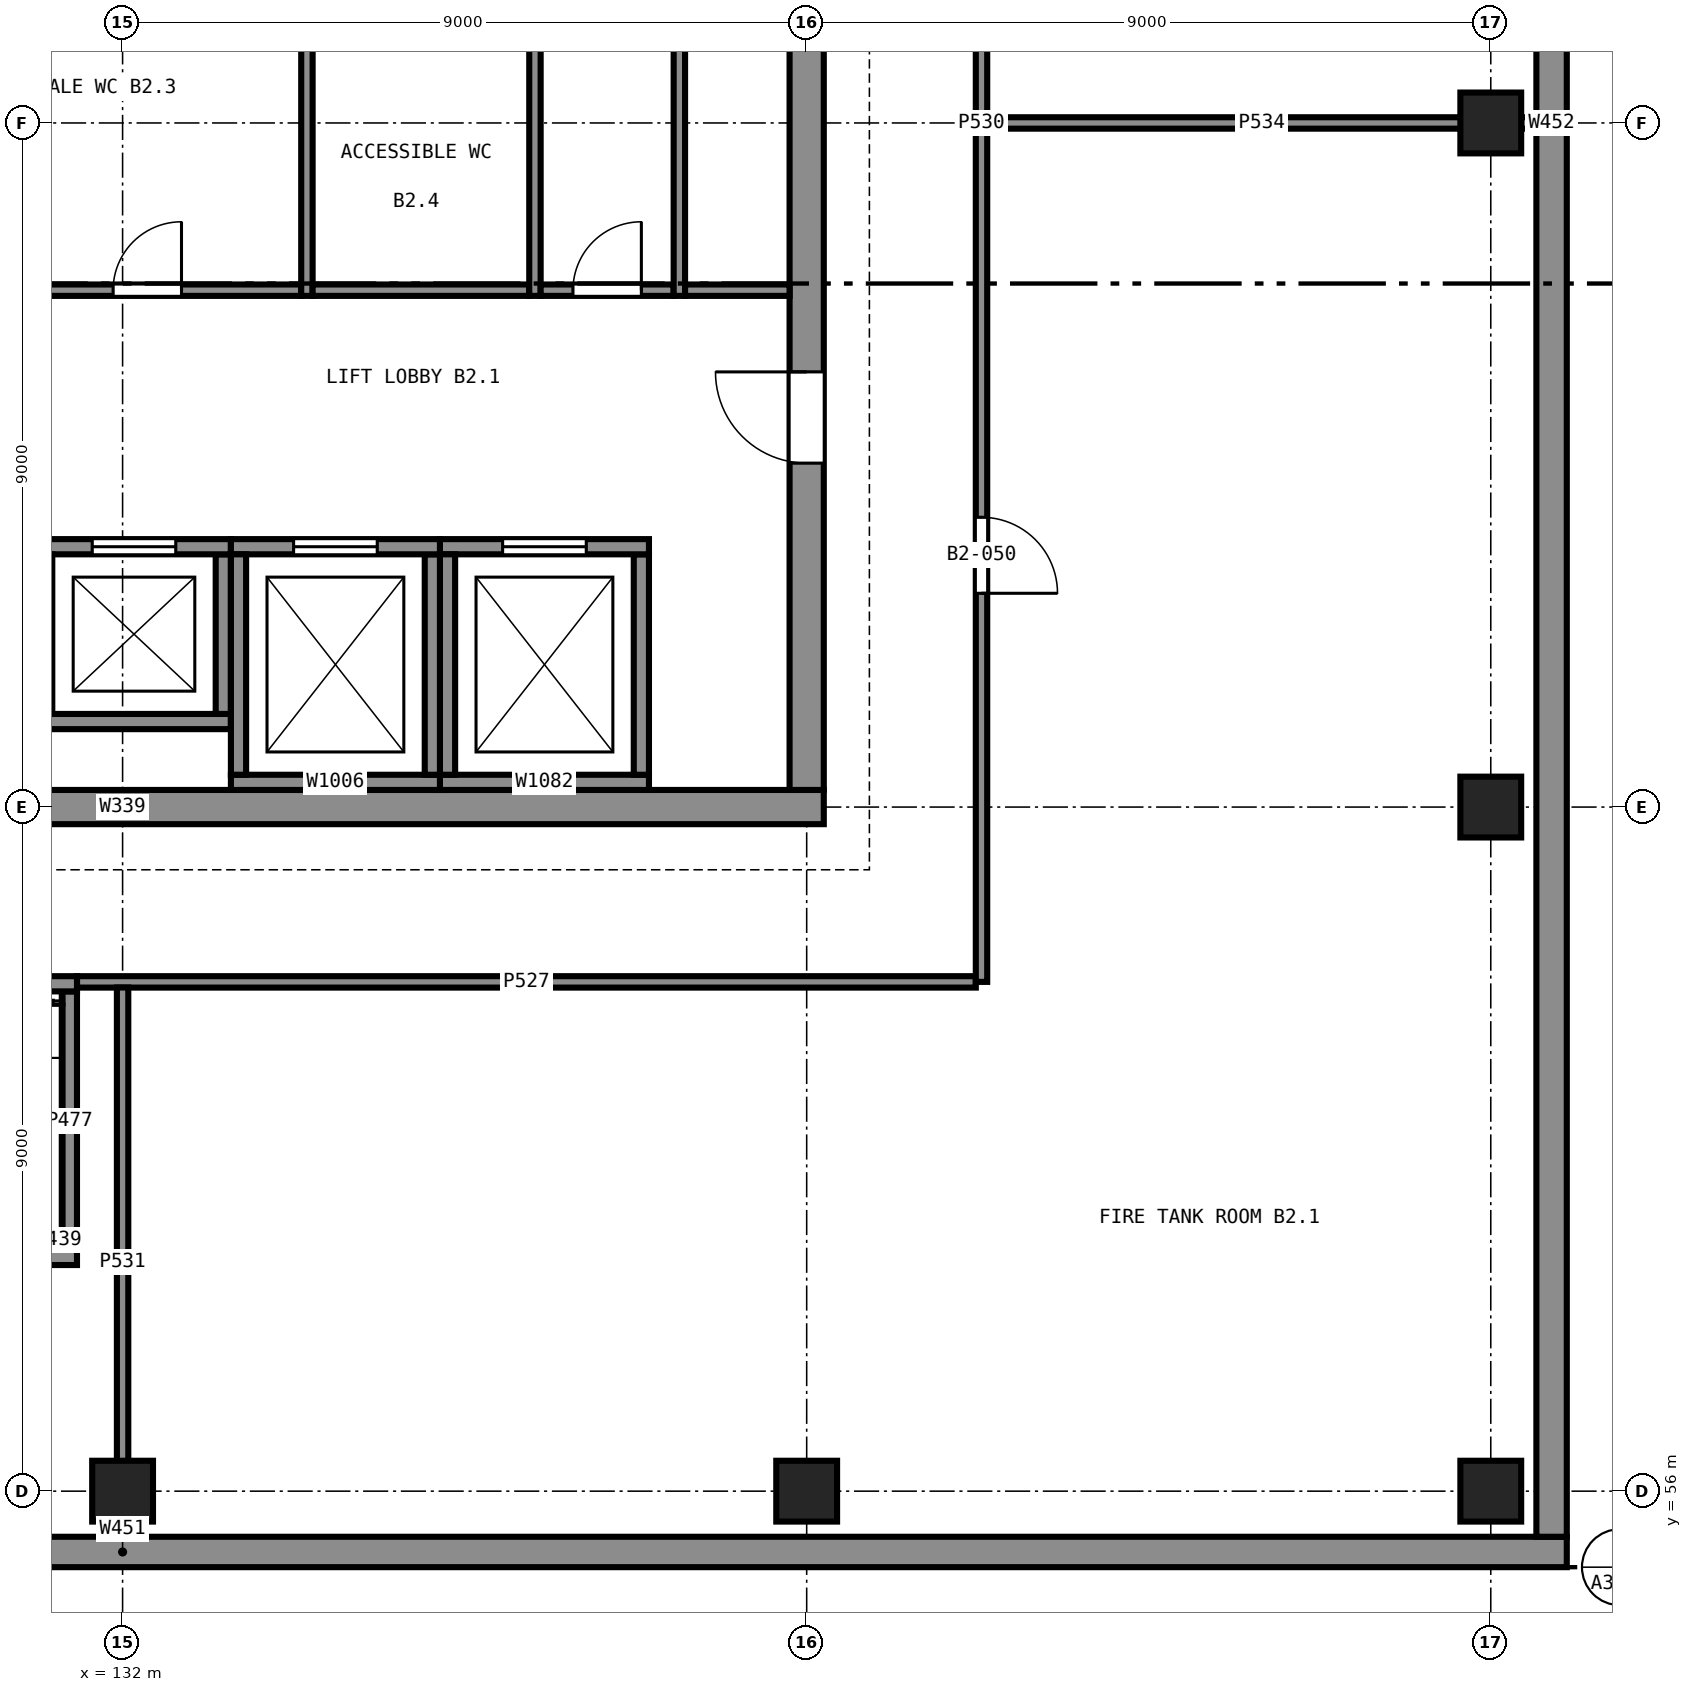
"""IFC4 building model, lengths in metres.
Left out: names, types, materials, properties, quantities, classifications, styles, units other than length and angle.
Written with IfcOpenShell. Run it as: python <this file> out.ifc"""

import sys

from ifc_helpers import new_model, si_unit, direction, frame, frame_2d, origin, origin_2d, place, context, subcontext, project, spatial, rectangle, extrude, element, fill, save


model = new_model("IFC4")
c1 = context("Model", 3, precision=1e-05, world=origin(), true_north=direction((0.0, 1.0)))
c2 = subcontext(c1, "Body", "Model", "MODEL_VIEW")
j1 = project(units=[si_unit("LENGTHUNIT", "METRE"), si_unit("PLANEANGLEUNIT", "RADIAN")], contexts=[c1])
p1 = place(None, origin())
s1 = spatial("IfcSite", under=j1, at=p1, CompositionType="ELEMENT")
p2 = place(p1, origin())
s2 = spatial("IfcBuilding", under=s1, at=p2, CompositionType="ELEMENT")
p3 = place(p2, frame((0.0, 0.0, -10.0)))
s3 = spatial("IfcBuildingStorey", under=s2, at=p3, CompositionType="ELEMENT", Elevation=-10.0)
for number, where, z_axis, x_axis in (
    (1, (132.0, 56.0, 0.0), (0.0, 0.0, 1.0), (1.0, 0.0, 0.0)),
    (2, (141.0, 56.0, 0.0), (0.0, 0.0, 1.0), (1.0, 0.0, 0.0)),
    (3, (150.0, 56.0, 0.0), (0.0, 0.0, 1.0), (1.0, 0.0, 0.0)),
    (4, (150.0, 65.0, 0.0), (0.0, 0.0, 1.0), (1.0, 0.0, 0.0)),
    (5, (150.0, 74.0, 0.0), (0.0, 0.0, 1.0), (1.0, 0.0, 0.0)),
):
    element("IfcColumn", number, at=place(p3, frame(where, z_axis=z_axis, x_axis=x_axis)), inside=s3, PredefinedType="COLUMN", context=c2, shape_type="SweptSolid", body=[
        extrude(rectangle(XDim=0.8, YDim=0.8, at=origin_2d()), origin(), (0.0, 0.0, 1.0), 5.0),
    ])
p4 = place(p3, frame((122.775, 65.0, 0.0), z_axis=(0.0, 0.0, 1.0), x_axis=(1.0, 0.0, 0.0)))
e6 = element("IfcWall", 6, at=p4, inside=s3, PredefinedType="SHEAR", context=c2, shape_type="SweptSolid", body=[
    extrude(rectangle(XDim=18.45, YDim=0.45, at=frame_2d((9.225, 0.0))), origin(), (0.0, 0.0, 1.0), 5.0),
])
p5 = place(p3, frame((141.0, 65.225, 0.0), z_axis=(0.0, 0.0, 1.0), x_axis=(0.0, 1.0, 0.0)))
e7 = element("IfcWall", 7, at=p5, inside=s3, PredefinedType="SHEAR", context=c2, shape_type="SweptSolid", body=[
    extrude(rectangle(XDim=17.55, YDim=0.45, at=frame_2d((8.775, 0.0))), origin(), (0.0, 0.0, 1.0), 5.0),
])
p6 = place(p5, frame((4.3, 0.0, 0.0)))
e8 = element("IfcOpeningElement", 8, at=p6, cuts=e7, PredefinedType="OPENING", context=c2, shape_type="SweptSolid", body=[
    extrude(rectangle(XDim=1.2, YDim=2.1, at=frame_2d((0.6, 1.05))), frame((0.0, 0.235, 0.0), z_axis=(0.0, -1.0, 0.0), x_axis=(1.0, 0.0, 0.0)), (0.0, 0.0, 1.0), 0.47),
])
p7 = place(p5, frame((12.05, 0.0, 0.0)))
e9 = element("IfcOpeningElement", 9, at=p7, cuts=e7, PredefinedType="OPENING", context=c2, shape_type="SweptSolid", body=[
    extrude(rectangle(XDim=1.2, YDim=2.1, at=frame_2d((0.6, 1.05))), frame((0.0, 0.235, 0.0), z_axis=(0.0, -1.0, 0.0), x_axis=(1.0, 0.0, 0.0)), (0.0, 0.0, 1.0), 0.47),
])
p8 = place(p3, frame((113.0, 55.2, 0.0), z_axis=(0.0, 0.0, 1.0), x_axis=(1.0, 0.0, 0.0)))
e10 = element("IfcWall", 10, at=p8, inside=s3, PredefinedType="SOLIDWALL", context=c2, shape_type="SweptSolid", body=[
    extrude(rectangle(XDim=38.0, YDim=0.4, at=frame_2d((19.0, 0.0))), origin(), (0.0, 0.0, 1.0), 4.7),
])
p9 = place(p3, frame((150.8, 55.4, 0.0), z_axis=(0.0, 0.0, 1.0), x_axis=(0.0, 1.0, 0.0)))
e11 = element("IfcWall", 11, at=p9, inside=s3, PredefinedType="SOLIDWALL", context=c2, shape_type="SweptSolid", body=[
    extrude(rectangle(XDim=37.2, YDim=0.4, at=frame_2d((18.6, 0.0))), origin(), (0.0, 0.0, 1.0), 4.7),
])
p10 = place(p3, frame((130.875, 66.125, -1.9), z_axis=(0.0, 0.0, 1.0), x_axis=(1.0, 0.0, 0.0)))
e12 = element("IfcWall", 12, at=p10, inside=s3, PredefinedType="SHEAR", context=c2, shape_type="SweptSolid", body=[
    extrude(rectangle(XDim=2.55, YDim=0.2, at=frame_2d((1.275, 0.0))), origin(), (0.0, 0.0, 1.0), 6.9),
])
p11 = place(p3, frame((133.325, 66.225, -1.9), z_axis=(0.0, 0.0, 1.0), x_axis=(0.0, 1.0, 0.0)))
e13 = element("IfcWall", 13, at=p11, inside=s3, PredefinedType="SHEAR", context=c2, shape_type="SweptSolid", body=[
    extrude(rectangle(XDim=2.1, YDim=0.2, at=frame_2d((1.05, 0.0))), origin(), (0.0, 0.0, 1.0), 6.9),
])
p12 = place(p3, frame((133.425, 68.425, -1.9), z_axis=(0.0, 0.0, 1.0), x_axis=(-1.0, 0.0, 0.0)))
e14 = element("IfcWall", 14, at=p12, inside=s3, PredefinedType="SHEAR", context=c2, shape_type="SweptSolid", body=[
    extrude(rectangle(XDim=2.55, YDim=0.2, at=frame_2d((1.275, 0.0))), origin(), (0.0, 0.0, 1.0), 6.9),
])
p13 = place(p12, frame((0.725, 0.0, 1.9)))
e15 = element("IfcOpeningElement", 15, at=p13, cuts=e14, PredefinedType="OPENING", context=c2, shape_type="SweptSolid", body=[
    extrude(rectangle(XDim=1.1, YDim=2.1, at=frame_2d((0.55, 1.05))), frame((0.0, 0.11, 0.0), z_axis=(0.0, -1.0, 0.0), x_axis=(1.0, 0.0, 0.0)), (0.0, 0.0, 1.0), 0.22),
])
p14 = place(p3, frame((130.975, 68.325, -1.9), z_axis=(0.0, 0.0, 1.0), x_axis=(0.0, -1.0, 0.0)))
e16 = element("IfcWall", 16, at=p14, inside=s3, PredefinedType="SHEAR", context=c2, shape_type="SweptSolid", body=[
    extrude(rectangle(XDim=2.1, YDim=0.2, at=frame_2d((1.05, 0.0))), origin(), (0.0, 0.0, 1.0), 6.9),
])
p15 = place(p3, frame((133.425, 65.325, -1.9), z_axis=(0.0, 0.0, 1.0), x_axis=(1.0, 0.0, 0.0)))
e17 = element("IfcWall", 17, at=p15, inside=s3, PredefinedType="SHEAR", context=c2, shape_type="SweptSolid", body=[
    extrude(rectangle(XDim=2.75, YDim=0.2, at=frame_2d((1.375, 0.0))), origin(), (0.0, 0.0, 1.0), 6.9),
])
p16 = place(p3, frame((136.075, 65.425, -1.9), z_axis=(0.0, 0.0, 1.0), x_axis=(0.0, 1.0, 0.0)))
e18 = element("IfcWall", 18, at=p16, inside=s3, PredefinedType="SHEAR", context=c2, shape_type="SweptSolid", body=[
    extrude(rectangle(XDim=2.9, YDim=0.2, at=frame_2d((1.45, 0.0))), origin(), (0.0, 0.0, 1.0), 6.9),
])
p17 = place(p3, frame((136.175, 68.425, -1.9), z_axis=(0.0, 0.0, 1.0), x_axis=(-1.0, 0.0, 0.0)))
e19 = element("IfcWall", 19, at=p17, inside=s3, PredefinedType="SHEAR", context=c2, shape_type="SweptSolid", body=[
    extrude(rectangle(XDim=2.75, YDim=0.2, at=frame_2d((1.375, 0.0))), origin(), (0.0, 0.0, 1.0), 6.9),
])
p18 = place(p17, frame((0.825, 0.0, 1.9)))
e20 = element("IfcOpeningElement", 20, at=p18, cuts=e19, PredefinedType="OPENING", context=c2, shape_type="SweptSolid", body=[
    extrude(rectangle(XDim=1.1, YDim=2.1, at=frame_2d((0.55, 1.05))), frame((0.0, 0.11, 0.0), z_axis=(0.0, -1.0, 0.0), x_axis=(1.0, 0.0, 0.0)), (0.0, 0.0, 1.0), 0.22),
])
p19 = place(p3, frame((133.525, 68.325, -1.9), z_axis=(0.0, 0.0, 1.0), x_axis=(0.0, -1.0, 0.0)))
e21 = element("IfcWall", 21, at=p19, inside=s3, PredefinedType="SHEAR", context=c2, shape_type="SweptSolid", body=[
    extrude(rectangle(XDim=2.9, YDim=0.2, at=frame_2d((1.45, 0.0))), origin(), (0.0, 0.0, 1.0), 6.9),
])
p20 = place(p3, frame((136.175, 65.325, -1.9), z_axis=(0.0, 0.0, 1.0), x_axis=(1.0, 0.0, 0.0)))
e22 = element("IfcWall", 22, at=p20, inside=s3, PredefinedType="SHEAR", context=c2, shape_type="SweptSolid", body=[
    extrude(rectangle(XDim=2.75, YDim=0.2, at=frame_2d((1.375, 0.0))), origin(), (0.0, 0.0, 1.0), 6.9),
])
p21 = place(p3, frame((138.825, 65.425, -1.9), z_axis=(0.0, 0.0, 1.0), x_axis=(0.0, 1.0, 0.0)))
e23 = element("IfcWall", 23, at=p21, inside=s3, PredefinedType="SHEAR", context=c2, shape_type="SweptSolid", body=[
    extrude(rectangle(XDim=2.9, YDim=0.2, at=frame_2d((1.45, 0.0))), origin(), (0.0, 0.0, 1.0), 6.9),
])
p22 = place(p3, frame((138.925, 68.425, -1.9), z_axis=(0.0, 0.0, 1.0), x_axis=(-1.0, 0.0, 0.0)))
e24 = element("IfcWall", 24, at=p22, inside=s3, PredefinedType="SHEAR", context=c2, shape_type="SweptSolid", body=[
    extrude(rectangle(XDim=2.75, YDim=0.2, at=frame_2d((1.375, 0.0))), origin(), (0.0, 0.0, 1.0), 6.9),
])
p23 = place(p22, frame((0.825, 0.0, 1.9)))
e25 = element("IfcOpeningElement", 25, at=p23, cuts=e24, PredefinedType="OPENING", context=c2, shape_type="SweptSolid", body=[
    extrude(rectangle(XDim=1.1, YDim=2.1, at=frame_2d((0.55, 1.05))), frame((0.0, 0.11, 0.0), z_axis=(0.0, -1.0, 0.0), x_axis=(1.0, 0.0, 0.0)), (0.0, 0.0, 1.0), 0.22),
])
p24 = place(p3, frame((136.275, 68.325, -1.9), z_axis=(0.0, 0.0, 1.0), x_axis=(0.0, -1.0, 0.0)))
e26 = element("IfcWall", 26, at=p24, inside=s3, PredefinedType="SHEAR", context=c2, shape_type="SweptSolid", body=[
    extrude(rectangle(XDim=2.9, YDim=0.2, at=frame_2d((1.45, 0.0))), origin(), (0.0, 0.0, 1.0), 6.9),
])
p25 = place(p3, frame((123.6, 59.075, 0.0), z_axis=(0.0, 0.0, 1.0), x_axis=(1.0, 0.0, 0.0)))
e27 = element("IfcWall", 27, at=p25, inside=s3, PredefinedType="SHEAR", context=c2, shape_type="SweptSolid", body=[
    extrude(rectangle(XDim=7.8, YDim=0.2, at=frame_2d((3.9, 0.0))), origin(), (0.0, 0.0, 1.0), 4.7),
])
p26 = place(p3, frame((131.3, 59.175, 0.0), z_axis=(0.0, 0.0, 1.0), x_axis=(0.0, 1.0, 0.0)))
e28 = element("IfcWall", 28, at=p26, inside=s3, PredefinedType="SHEAR", context=c2, shape_type="SweptSolid", body=[
    extrude(rectangle(XDim=3.4, YDim=0.2, at=frame_2d((1.7, 0.0))), origin(), (0.0, 0.0, 1.0), 4.7),
])
p27 = place(p3, frame((131.4, 62.675, 0.0), z_axis=(0.0, 0.0, 1.0), x_axis=(-1.0, 0.0, 0.0)))
e29 = element("IfcWall", 29, at=p27, inside=s3, PredefinedType="SHEAR", context=c2, shape_type="SweptSolid", body=[
    extrude(rectangle(XDim=7.8, YDim=0.2, at=frame_2d((3.9, 0.0))), origin(), (0.0, 0.0, 1.0), 4.7),
])
p28 = place(p27, frame((6.2, 0.0, 0.0)))
e30 = element("IfcOpeningElement", 30, at=p28, cuts=e29, PredefinedType="OPENING", context=c2, shape_type="SweptSolid", body=[
    extrude(rectangle(XDim=1.0, YDim=2.1, at=frame_2d((0.5, 1.05))), frame((0.0, 0.11, 0.0), z_axis=(0.0, -1.0, 0.0), x_axis=(1.0, 0.0, 0.0)), (0.0, 0.0, 1.0), 0.22),
])
p29 = place(p3, frame((134.425, 71.725, 0.0), z_axis=(0.0, 0.0, 1.0), x_axis=(0.0, 1.0, 0.0)))
e31 = element("IfcWall", 31, at=p29, inside=s3, PredefinedType="PARTITIONING", context=c2, shape_type="SweptSolid", body=[
    extrude(rectangle(XDim=4.55, YDim=0.15, at=frame_2d((2.275, 0.0))), origin(), (0.0, 0.0, 1.0), 4.7),
])
p30 = place(p3, frame((130.3, 71.8, 0.0), z_axis=(0.0, 0.0, 1.0), x_axis=(1.0, 0.0, 0.0)))
e32 = element("IfcWall", 32, at=p30, inside=s3, PredefinedType="PARTITIONING", context=c2, shape_type="SweptSolid", body=[
    extrude(rectangle(XDim=4.05, YDim=0.15, at=frame_2d((2.025, 0.0))), origin(), (0.0, 0.0, 1.0), 4.7),
])
p31 = place(p30, frame((1.575, 0.0, 0.0)))
e33 = element("IfcOpeningElement", 33, at=p31, cuts=e32, PredefinedType="OPENING", context=c2, shape_type="SweptSolid", body=[
    extrude(rectangle(XDim=0.9, YDim=2.1, at=frame_2d((0.45, 1.05))), frame((0.0, 0.085, 0.0), z_axis=(0.0, -1.0, 0.0), x_axis=(1.0, 0.0, 0.0)), (0.0, 0.0, 1.0), 0.17),
])
p32 = place(p3, frame((137.425, 71.725, 0.0), z_axis=(0.0, 0.0, 1.0), x_axis=(0.0, 1.0, 0.0)))
e34 = element("IfcWall", 34, at=p32, inside=s3, PredefinedType="PARTITIONING", context=c2, shape_type="SweptSolid", body=[
    extrude(rectangle(XDim=4.55, YDim=0.15, at=frame_2d((2.275, 0.0))), origin(), (0.0, 0.0, 1.0), 4.7),
])
p33 = place(p3, frame((134.5, 71.8, 0.0), z_axis=(0.0, 0.0, 1.0), x_axis=(1.0, 0.0, 0.0)))
e35 = element("IfcWall", 35, at=p33, inside=s3, PredefinedType="PARTITIONING", context=c2, shape_type="SweptSolid", body=[
    extrude(rectangle(XDim=2.85, YDim=0.15, at=frame_2d((1.425, 0.0))), origin(), (0.0, 0.0, 1.0), 4.7),
])
p34 = place(p3, frame((139.325, 71.725, 0.0), z_axis=(0.0, 0.0, 1.0), x_axis=(0.0, 1.0, 0.0)))
e36 = element("IfcWall", 36, at=p34, inside=s3, PredefinedType="PARTITIONING", context=c2, shape_type="SweptSolid", body=[
    extrude(rectangle(XDim=4.55, YDim=0.15, at=frame_2d((2.275, 0.0))), origin(), (0.0, 0.0, 1.0), 4.7),
])
p35 = place(p3, frame((137.5, 71.8, 0.0), z_axis=(0.0, 0.0, 1.0), x_axis=(1.0, 0.0, 0.0)))
e37 = element("IfcWall", 37, at=p35, inside=s3, PredefinedType="PARTITIONING", context=c2, shape_type="SweptSolid", body=[
    extrude(rectangle(XDim=1.75, YDim=0.15, at=frame_2d((0.875, 0.0))), origin(), (0.0, 0.0, 1.0), 4.7),
])
p36 = place(p35, frame((0.425, 0.0, 0.0)))
e38 = element("IfcOpeningElement", 38, at=p36, cuts=e37, PredefinedType="OPENING", context=c2, shape_type="SweptSolid", body=[
    extrude(rectangle(XDim=0.9, YDim=2.1, at=frame_2d((0.45, 1.05))), frame((0.0, 0.085, 0.0), z_axis=(0.0, -1.0, 0.0), x_axis=(1.0, 0.0, 0.0)), (0.0, 0.0, 1.0), 0.17),
])
p37 = place(p3, frame((139.4, 71.8, 0.0), z_axis=(0.0, 0.0, 1.0), x_axis=(1.0, 0.0, 0.0)))
e39 = element("IfcWall", 39, at=p37, inside=s3, PredefinedType="PARTITIONING", context=c2, shape_type="SweptSolid", body=[
    extrude(rectangle(XDim=1.375, YDim=0.15, at=frame_2d((0.688, 0.0))), origin(), (0.0, 0.0, 1.0), 4.7),
])
p38 = place(p3, frame((143.225, 62.7, 0.0), z_axis=(0.0, 0.0, 1.0), x_axis=(-1.0, 0.0, 0.0)))
e40 = element("IfcWall", 40, at=p38, inside=s3, PredefinedType="PARTITIONING", context=c2, shape_type="SweptSolid", body=[
    extrude(rectangle(XDim=11.825, YDim=0.15, at=frame_2d((5.913, 0.0))), origin(), (0.0, 0.0, 1.0), 4.7),
])
p39 = place(p3, frame((143.3, 85.3, 0.0), z_axis=(0.0, 0.0, 1.0), x_axis=(0.0, -1.0, 0.0)))
e41 = element("IfcWall", 41, at=p39, inside=s3, PredefinedType="PARTITIONING", context=c2, shape_type="SweptSolid", body=[
    extrude(rectangle(XDim=22.6, YDim=0.15, at=frame_2d((11.3, 0.0))), origin(), (0.0, 0.0, 1.0), 4.7),
])
p40 = place(p39, frame((16.488, 0.0, 0.0)))
e42 = element("IfcOpeningElement", 42, at=p40, cuts=e41, PredefinedType="OPENING", context=c2, shape_type="SweptSolid", body=[
    extrude(rectangle(XDim=1.0, YDim=2.1, at=frame_2d((0.5, 1.05))), frame((0.0, 0.085, 0.0), z_axis=(0.0, -1.0, 0.0), x_axis=(1.0, 0.0, 0.0)), (0.0, 0.0, 1.0), 0.17),
])
p41 = place(p39, frame((5.113, 0.0, 0.0)))
e43 = element("IfcOpeningElement", 43, at=p41, cuts=e41, PredefinedType="OPENING", context=c2, shape_type="SweptSolid", body=[
    extrude(rectangle(XDim=1.0, YDim=2.1, at=frame_2d((0.5, 1.05))), frame((0.0, 0.085, 0.0), z_axis=(0.0, -1.0, 0.0), x_axis=(1.0, 0.0, 0.0)), (0.0, 0.0, 1.0), 0.17),
])
for number, where, z_axis, x_axis in (
    (44, (132.0, 55.399, 0.0), (0.0, 0.0, 1.0), (0.0, 1.0, 0.0)),
    (45, (143.374, 74.0, 0.0), (0.0, 0.0, 1.0), (1.0, 0.0, 0.0)),
):
    element("IfcWall", number, at=place(p3, frame(where, z_axis=z_axis, x_axis=x_axis)), inside=s3, PredefinedType="PARTITIONING", context=c2, shape_type="SweptSolid", body=[
        extrude(rectangle(XDim=7.227, YDim=0.15, at=frame_2d((3.614, 0.0))), origin(), (0.0, 0.0, 1.0), 3.8),
    ])
p42 = place(p13, origin())
e46 = element("IfcDoor", 46, at=p42, inside=s3, OperationType="SLIDING_TO_LEFT", PredefinedType="DOOR", context=c2, shape_type="SweptSolid", body=[
    extrude(rectangle(XDim=1.1, YDim=2.1, at=frame_2d((0.55, 1.05))), frame((0.0, 0.025, 0.0), z_axis=(0.0, -1.0, 0.0), x_axis=(1.0, 0.0, 0.0)), (0.0, 0.0, 1.0), 0.05),
])
fill(e15, e46)
p43 = place(p18, origin())
e47 = element("IfcDoor", 47, at=p43, inside=s3, OperationType="SLIDING_TO_LEFT", PredefinedType="DOOR", context=c2, shape_type="SweptSolid", body=[
    extrude(rectangle(XDim=1.1, YDim=2.1, at=frame_2d((0.55, 1.05))), frame((0.0, 0.025, 0.0), z_axis=(0.0, -1.0, 0.0), x_axis=(1.0, 0.0, 0.0)), (0.0, 0.0, 1.0), 0.05),
])
fill(e20, e47)
p44 = place(p23, origin())
e48 = element("IfcDoor", 48, at=p44, inside=s3, OperationType="SLIDING_TO_LEFT", PredefinedType="DOOR", context=c2, shape_type="SweptSolid", body=[
    extrude(rectangle(XDim=1.1, YDim=2.1, at=frame_2d((0.55, 1.05))), frame((0.0, 0.025, 0.0), z_axis=(0.0, -1.0, 0.0), x_axis=(1.0, 0.0, 0.0)), (0.0, 0.0, 1.0), 0.05),
])
fill(e25, e48)
p45 = place(p6, origin())
e49 = element("IfcDoor", 49, at=p45, inside=s3, OperationType="SINGLE_SWING_LEFT", PredefinedType="DOOR", context=c2, shape_type="SweptSolid", body=[
    extrude(rectangle(XDim=1.2, YDim=2.1, at=frame_2d((0.6, 1.05))), frame((0.0, 0.025, 0.0), z_axis=(0.0, -1.0, 0.0), x_axis=(1.0, 0.0, 0.0)), (0.0, 0.0, 1.0), 0.05),
])
fill(e8, e49)
p46 = place(p31, origin())
e50 = element("IfcDoor", 50, at=p46, inside=s3, OperationType="SINGLE_SWING_LEFT", PredefinedType="DOOR", context=c2, shape_type="SweptSolid", body=[
    extrude(rectangle(XDim=0.9, YDim=2.1, at=frame_2d((0.45, 1.05))), frame((0.0, 0.025, 0.0), z_axis=(0.0, -1.0, 0.0), x_axis=(1.0, 0.0, 0.0)), (0.0, 0.0, 1.0), 0.05),
])
fill(e33, e50)
p47 = place(p36, origin())
e51 = element("IfcDoor", 51, at=p47, inside=s3, OperationType="SINGLE_SWING_LEFT", PredefinedType="DOOR", context=c2, shape_type="SweptSolid", body=[
    extrude(rectangle(XDim=0.9, YDim=2.1, at=frame_2d((0.45, 1.05))), frame((0.0, 0.025, 0.0), z_axis=(0.0, -1.0, 0.0), x_axis=(1.0, 0.0, 0.0)), (0.0, 0.0, 1.0), 0.05),
])
fill(e38, e51)
p48 = place(p40, origin())
e52 = element("IfcDoor", 52, at=p48, inside=s3, OperationType="SINGLE_SWING_LEFT", PredefinedType="DOOR", context=c2, shape_type="SweptSolid", body=[
    extrude(rectangle(XDim=1.0, YDim=2.1, at=frame_2d((0.5, 1.05))), frame((0.0, 0.025, 0.0), z_axis=(0.0, -1.0, 0.0), x_axis=(1.0, 0.0, 0.0)), (0.0, 0.0, 1.0), 0.05),
])
fill(e42, e52)
save(model, sys.argv[1])
